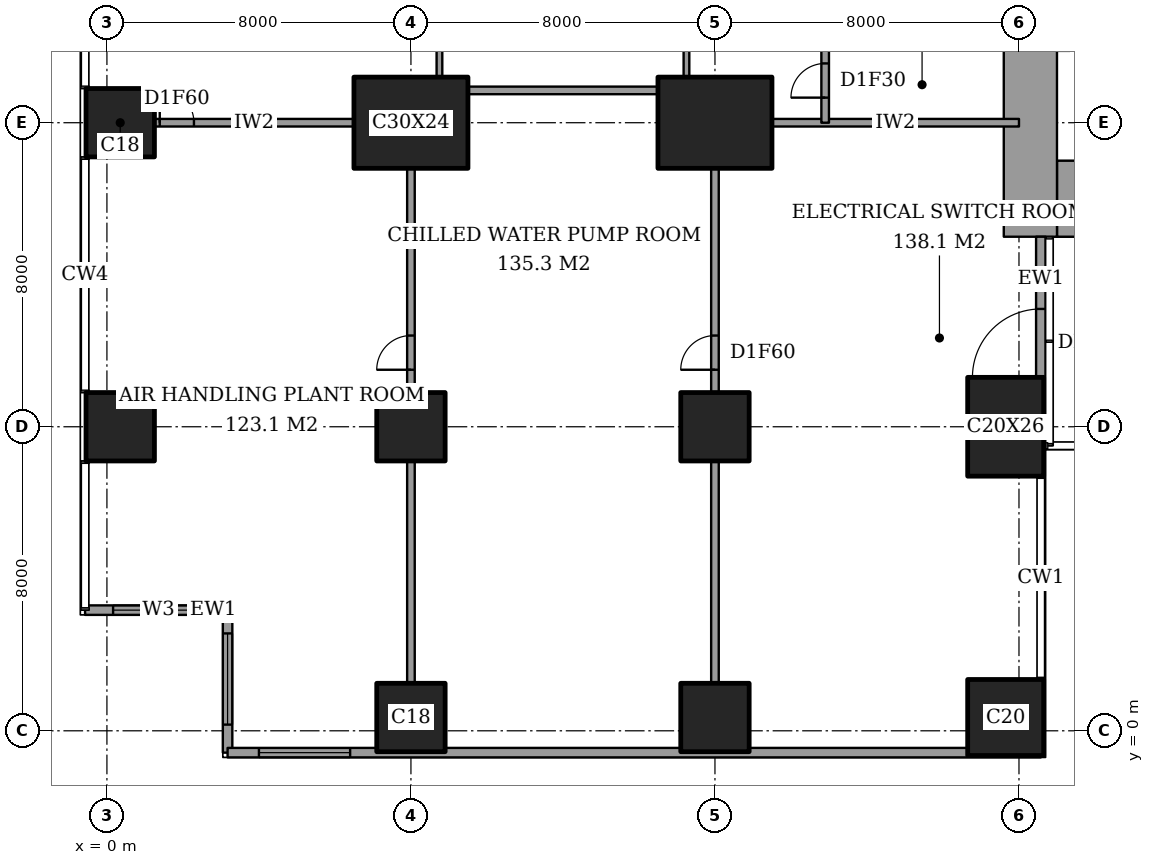
"""IFC4 building model, lengths in metres.
Left out: names, types, materials, properties, quantities, classifications, styles, units other than length and angle.
Written with IfcOpenShell. Run it as: python <this file> out.ifc"""

import sys

from ifc_helpers import new_model, si_unit, direction, frame, frame_2d, origin, origin_2d, place, context, subcontext, project, spatial, rectangle, extrude, element, fill, save


model = new_model("IFC4")
c1 = context("Model", 3, precision=1e-05, world=origin(), true_north=direction((0.0, 1.0)))
c2 = subcontext(c1, "Body", "Model", "MODEL_VIEW")
j1 = project(units=[si_unit("LENGTHUNIT", "METRE"), si_unit("PLANEANGLEUNIT", "RADIAN")], contexts=[c1])
p1 = place(None, origin())
s1 = spatial("IfcSite", under=j1, at=p1, CompositionType="ELEMENT")
p2 = place(p1, origin())
s2 = spatial("IfcBuilding", under=s1, at=p2, CompositionType="ELEMENT")
p3 = place(p2, frame((0.0, 0.0, 177.2)))
s3 = spatial("IfcBuildingStorey", under=s2, at=p3, CompositionType="ELEMENT", Elevation=177.2)
for number, where, z_axis, x_axis in (
    (1, (0.35, 8.0, 0.0), (0.0, 0.0, 1.0), (1.0, 0.0, 0.0)),
    (2, (0.35, 16.0, 0.0), (0.0, 0.0, 1.0), (1.0, 0.0, 0.0)),
    (3, (8.0, 0.35, 0.0), (0.0, 0.0, 1.0), (1.0, 0.0, 0.0)),
    (4, (8.0, 8.0, 0.0), (0.0, 0.0, 1.0), (1.0, 0.0, 0.0)),
):
    element("IfcColumn", number, at=place(p3, frame(where, z_axis=z_axis, x_axis=x_axis)), inside=s3, PredefinedType="COLUMN", context=c2, shape_type="SweptSolid", body=[
        extrude(rectangle(XDim=1.8, YDim=1.8, at=origin_2d()), origin(), (0.0, 0.0, 1.0), 5.0),
    ])
p4 = place(p3, frame((8.0, 16.0, 0.0), z_axis=(0.0, 0.0, 1.0), x_axis=(1.0, 0.0, 0.0)))
e5 = element("IfcColumn", 5, at=p4, inside=s3, PredefinedType="COLUMN", context=c2, shape_type="SweptSolid", body=[
    extrude(rectangle(XDim=3.0, YDim=2.4, at=origin_2d()), origin(), (0.0, 0.0, 1.0), 5.0),
])
for number, where, z_axis, x_axis in (
    (6, (16.0, 0.35, 0.0), (0.0, 0.0, 1.0), (1.0, 0.0, 0.0)),
    (7, (16.0, 8.0, 0.0), (0.0, 0.0, 1.0), (1.0, 0.0, 0.0)),
):
    element("IfcColumn", number, at=place(p3, frame(where, z_axis=z_axis, x_axis=x_axis)), inside=s3, PredefinedType="COLUMN", context=c2, shape_type="SweptSolid", body=[
        extrude(rectangle(XDim=1.8, YDim=1.8, at=origin_2d()), origin(), (0.0, 0.0, 1.0), 5.0),
    ])
p5 = place(p3, frame((16.0, 16.0, 0.0), z_axis=(0.0, 0.0, 1.0), x_axis=(1.0, 0.0, 0.0)))
e8 = element("IfcColumn", 8, at=p5, inside=s3, PredefinedType="COLUMN", context=c2, shape_type="SweptSolid", body=[
    extrude(rectangle(XDim=3.0, YDim=2.4, at=origin_2d()), origin(), (0.0, 0.0, 1.0), 5.0),
])
p6 = place(p3, frame((23.65, 0.35, 0.0), z_axis=(0.0, 0.0, 1.0), x_axis=(1.0, 0.0, 0.0)))
e9 = element("IfcColumn", 9, at=p6, inside=s3, PredefinedType="COLUMN", context=c2, shape_type="SweptSolid", body=[
    extrude(rectangle(XDim=2.0, YDim=2.0, at=origin_2d()), origin(), (0.0, 0.0, 1.0), 5.0),
])
p7 = place(p3, frame((23.65, 8.0, 0.0), z_axis=(0.0, 0.0, 1.0), x_axis=(1.0, 0.0, 0.0)))
e10 = element("IfcColumn", 10, at=p7, inside=s3, PredefinedType="COLUMN", context=c2, shape_type="SweptSolid", body=[
    extrude(rectangle(XDim=2.0, YDim=2.6, at=origin_2d()), origin(), (0.0, 0.0, 1.0), 5.0),
])
p8 = place(p3, frame((25.0, 14.0, 0.0), z_axis=(0.0, 0.0, 1.0), x_axis=(1.0, 0.0, 0.0)))
e11 = element("IfcWall", 11, at=p8, inside=s3, PredefinedType="SHEAR", context=c2, shape_type="SweptSolid", body=[
    extrude(rectangle(XDim=3.15, YDim=2.0, at=frame_2d((1.575, 0.0))), origin(), (0.0, 0.0, 1.0), 5.0),
])
p9 = place(p3, frame((24.3, 13.0, 0.0), z_axis=(0.0, 0.0, 1.0), x_axis=(0.0, 1.0, 0.0)))
e12 = element("IfcWall", 12, at=p9, inside=s3, PredefinedType="SHEAR", context=c2, shape_type="SweptSolid", body=[
    extrude(rectangle(XDim=10.15, YDim=1.4, at=frame_2d((5.075, 0.0))), origin(), (0.0, 0.0, 1.0), 5.0),
])
p10 = place(p3, frame((24.575, 7.4, 0.0), z_axis=(0.0, 0.0, 1.0), x_axis=(0.0, 1.0, 0.0)))
e13 = element("IfcWall", 13, at=p10, inside=s3, PredefinedType="SOLIDWALL", context=c2, shape_type="SweptSolid", body=[
    extrude(rectangle(XDim=5.6, YDim=0.25, at=frame_2d((2.8, 0.0))), origin(), (0.0, 0.0, 1.0), 5.0),
])
p11 = place(p10, frame((1.9, 0.0, 0.0)))
e14 = element("IfcOpeningElement", 14, at=p11, cuts=e13, PredefinedType="OPENING", context=c2, shape_type="SweptSolid", body=[
    extrude(rectangle(XDim=1.8, YDim=2.4, at=frame_2d((0.9, 1.2))), frame((0.0, 0.135, 0.0), z_axis=(0.0, -1.0, 0.0), x_axis=(1.0, 0.0, 0.0)), (0.0, 0.0, 1.0), 0.27),
])
p12 = place(p3, frame((-0.575, 3.175, 0.0), z_axis=(0.0, 0.0, 1.0), x_axis=(1.0, 0.0, 0.0)))
e15 = element("IfcWall", 15, at=p12, inside=s3, PredefinedType="SOLIDWALL", context=c2, shape_type="SweptSolid", body=[
    extrude(rectangle(XDim=3.75, YDim=0.25, at=frame_2d((1.875, 0.0))), origin(), (0.0, 0.0, 1.0), 5.0),
])
p13 = place(p12, frame((0.738, 0.0, 0.6)))
e16 = element("IfcOpeningElement", 16, at=p13, cuts=e15, PredefinedType="OPENING", context=c2, shape_type="SweptSolid", body=[
    extrude(rectangle(XDim=2.4, YDim=3.0, at=frame_2d((1.2, 1.5))), frame((0.0, 0.135, 0.0), z_axis=(0.0, -1.0, 0.0), x_axis=(1.0, 0.0, 0.0)), (0.0, 0.0, 1.0), 0.27),
])
p14 = place(p3, frame((3.175, 3.175, 0.0), z_axis=(0.0, 0.0, 1.0), x_axis=(0.0, -1.0, 0.0)))
e17 = element("IfcWall", 17, at=p14, inside=s3, PredefinedType="SOLIDWALL", context=c2, shape_type="SweptSolid", body=[
    extrude(rectangle(XDim=3.75, YDim=0.25, at=frame_2d((1.875, 0.0))), origin(), (0.0, 0.0, 1.0), 5.0),
])
p15 = place(p14, frame((0.613, 0.0, 0.6)))
e18 = element("IfcOpeningElement", 18, at=p15, cuts=e17, PredefinedType="OPENING", context=c2, shape_type="SweptSolid", body=[
    extrude(rectangle(XDim=2.4, YDim=3.0, at=frame_2d((1.2, 1.5))), frame((0.0, 0.135, 0.0), z_axis=(0.0, -1.0, 0.0), x_axis=(1.0, 0.0, 0.0)), (0.0, 0.0, 1.0), 0.27),
])
p16 = place(p3, frame((3.175, -0.575, 0.0), z_axis=(0.0, 0.0, 1.0), x_axis=(1.0, 0.0, 0.0)))
e19 = element("IfcWall", 19, at=p16, inside=s3, PredefinedType="SOLIDWALL", context=c2, shape_type="SweptSolid", body=[
    extrude(rectangle(XDim=21.4, YDim=0.25, at=frame_2d((10.7, 0.0))), origin(), (0.0, 0.0, 1.0), 5.0),
])
p17 = place(p16, frame((0.825, 0.0, 0.6)))
e20 = element("IfcOpeningElement", 20, at=p17, cuts=e19, PredefinedType="OPENING", context=c2, shape_type="SweptSolid", body=[
    extrude(rectangle(XDim=2.4, YDim=3.0, at=frame_2d((1.2, 1.5))), frame((0.0, 0.135, 0.0), z_axis=(0.0, -1.0, 0.0), x_axis=(1.0, 0.0, 0.0)), (0.0, 0.0, 1.0), 0.27),
])
p18 = place(p3, frame((1.25, 16.0, 0.0), z_axis=(0.0, 0.0, 1.0), x_axis=(1.0, 0.0, 0.0)))
e21 = element("IfcWall", 21, at=p18, inside=s3, PredefinedType="PARTITIONING", context=c2, shape_type="SweptSolid", body=[
    extrude(rectangle(XDim=5.25, YDim=0.2, at=frame_2d((2.625, 0.0))), origin(), (0.0, 0.0, 1.0), 4.75),
])
p19 = place(p18, frame((0.14, 0.0, 0.0)))
e22 = element("IfcOpeningElement", 22, at=p19, cuts=e21, PredefinedType="OPENING", context=c2, shape_type="SweptSolid", body=[
    extrude(rectangle(XDim=0.9, YDim=2.1, at=frame_2d((0.45, 1.05))), frame((0.0, 0.11, 0.0), z_axis=(0.0, -1.0, 0.0), x_axis=(1.0, 0.0, 0.0)), (0.0, 0.0, 1.0), 0.22),
])
p20 = place(p3, frame((17.5, 16.0, 0.0), z_axis=(0.0, 0.0, 1.0), x_axis=(1.0, 0.0, 0.0)))
e23 = element("IfcWall", 23, at=p20, inside=s3, PredefinedType="PARTITIONING", context=c2, shape_type="SweptSolid", body=[
    extrude(rectangle(XDim=6.5, YDim=0.2, at=frame_2d((3.25, 0.0))), origin(), (0.0, 0.0, 1.0), 4.75),
])
p21 = place(p3, frame((9.5, 16.85, 0.0), z_axis=(0.0, 0.0, 1.0), x_axis=(1.0, 0.0, 0.0)))
e24 = element("IfcWall", 24, at=p21, inside=s3, PredefinedType="PARTITIONING", context=c2, shape_type="SweptSolid", body=[
    extrude(rectangle(XDim=5.0, YDim=0.2, at=frame_2d((2.5, 0.0))), origin(), (0.0, 0.0, 1.0), 4.75),
])
p22 = place(p3, frame((8.0, 1.25, 0.0), z_axis=(0.0, 0.0, 1.0), x_axis=(0.0, 1.0, 0.0)))
e25 = element("IfcWall", 25, at=p22, inside=s3, PredefinedType="PARTITIONING", context=c2, shape_type="SweptSolid", body=[
    extrude(rectangle(XDim=5.85, YDim=0.2, at=frame_2d((2.925, 0.0))), origin(), (0.0, 0.0, 1.0), 4.75),
])
p23 = place(p3, frame((8.0, 8.9, 0.0), z_axis=(0.0, 0.0, 1.0), x_axis=(0.0, 1.0, 0.0)))
e26 = element("IfcWall", 26, at=p23, inside=s3, PredefinedType="PARTITIONING", context=c2, shape_type="SweptSolid", body=[
    extrude(rectangle(XDim=5.9, YDim=0.2, at=frame_2d((2.95, 0.0))), origin(), (0.0, 0.0, 1.0), 4.75),
])
p24 = place(p23, frame((0.6, 0.0, 0.0)))
e27 = element("IfcOpeningElement", 27, at=p24, cuts=e26, PredefinedType="OPENING", context=c2, shape_type="SweptSolid", body=[
    extrude(rectangle(XDim=0.9, YDim=2.1, at=frame_2d((0.45, 1.05))), frame((0.0, 0.11, 0.0), z_axis=(0.0, -1.0, 0.0), x_axis=(1.0, 0.0, 0.0)), (0.0, 0.0, 1.0), 0.22),
])
p25 = place(p3, frame((8.75, 17.2, 0.0), z_axis=(0.0, 0.0, 1.0), x_axis=(0.0, 1.0, 0.0)))
e28 = element("IfcWall", 28, at=p25, inside=s3, PredefinedType="PARTITIONING", context=c2, shape_type="SweptSolid", body=[
    extrude(rectangle(XDim=5.9, YDim=0.15, at=frame_2d((2.95, 0.0))), origin(), (0.0, 0.0, 1.0), 4.75),
])
p26 = place(p25, frame((4.14, 0.0, 0.0)))
e29 = element("IfcOpeningElement", 29, at=p26, cuts=e28, PredefinedType="OPENING", context=c2, shape_type="SweptSolid", body=[
    extrude(rectangle(XDim=1.0, YDim=2.1, at=frame_2d((0.5, 1.05))), frame((0.0, 0.085, 0.0), z_axis=(0.0, -1.0, 0.0), x_axis=(1.0, 0.0, 0.0)), (0.0, 0.0, 1.0), 0.17),
])
p27 = place(p3, frame((15.25, 17.2, 0.0), z_axis=(0.0, 0.0, 1.0), x_axis=(0.0, 1.0, 0.0)))
e30 = element("IfcWall", 30, at=p27, inside=s3, PredefinedType="PARTITIONING", context=c2, shape_type="SweptSolid", body=[
    extrude(rectangle(XDim=5.9, YDim=0.15, at=frame_2d((2.95, 0.0))), origin(), (0.0, 0.0, 1.0), 4.75),
])
p28 = place(p3, frame((16.0, 1.25, 0.0), z_axis=(0.0, 0.0, 1.0), x_axis=(0.0, 1.0, 0.0)))
e31 = element("IfcWall", 31, at=p28, inside=s3, PredefinedType="PARTITIONING", context=c2, shape_type="SweptSolid", body=[
    extrude(rectangle(XDim=5.85, YDim=0.2, at=frame_2d((2.925, 0.0))), origin(), (0.0, 0.0, 1.0), 4.75),
])
p29 = place(p3, frame((16.0, 8.9, 0.0), z_axis=(0.0, 0.0, 1.0), x_axis=(0.0, 1.0, 0.0)))
e32 = element("IfcWall", 32, at=p29, inside=s3, PredefinedType="PARTITIONING", context=c2, shape_type="SweptSolid", body=[
    extrude(rectangle(XDim=5.9, YDim=0.2, at=frame_2d((2.95, 0.0))), origin(), (0.0, 0.0, 1.0), 4.75),
])
p30 = place(p29, frame((0.6, 0.0, 0.0)))
e33 = element("IfcOpeningElement", 33, at=p30, cuts=e32, PredefinedType="OPENING", context=c2, shape_type="SweptSolid", body=[
    extrude(rectangle(XDim=0.9, YDim=2.1, at=frame_2d((0.45, 1.05))), frame((0.0, 0.11, 0.0), z_axis=(0.0, -1.0, 0.0), x_axis=(1.0, 0.0, 0.0)), (0.0, 0.0, 1.0), 0.22),
])
p31 = place(p3, frame((18.9, 16.0, 0.0), z_axis=(0.0, 0.0, 1.0), x_axis=(0.0, 1.0, 0.0)))
e34 = element("IfcWall", 34, at=p31, inside=s3, PredefinedType="PARTITIONING", context=c2, shape_type="SweptSolid", body=[
    extrude(rectangle(XDim=4.0, YDim=0.2, at=frame_2d((2.0, 0.0))), origin(), (0.0, 0.0, 1.0), 4.75),
])
p32 = place(p31, frame((0.66, 0.0, 0.0)))
e35 = element("IfcOpeningElement", 35, at=p32, cuts=e34, PredefinedType="OPENING", context=c2, shape_type="SweptSolid", body=[
    extrude(rectangle(XDim=0.9, YDim=2.1, at=frame_2d((0.45, 1.05))), frame((0.0, 0.11, 0.0), z_axis=(0.0, -1.0, 0.0), x_axis=(1.0, 0.0, 0.0)), (0.0, 0.0, 1.0), 0.22),
])
p33 = place(p31, frame((2.54, 0.0, 0.0)))
e36 = element("IfcOpeningElement", 36, at=p33, cuts=e34, PredefinedType="OPENING", context=c2, shape_type="SweptSolid", body=[
    extrude(rectangle(XDim=0.9, YDim=2.1, at=frame_2d((0.45, 1.05))), frame((0.0, 0.11, 0.0), z_axis=(0.0, -1.0, 0.0), x_axis=(1.0, 0.0, 0.0)), (0.0, 0.0, 1.0), 0.22),
])
p34 = place(p11, origin())
e37 = element("IfcDoor", 37, at=p34, inside=s3, OperationType="DOUBLE_DOOR_DOUBLE_SWING", PredefinedType="DOOR", context=c2, shape_type="SweptSolid", body=[
    extrude(rectangle(XDim=1.8, YDim=2.4, at=frame_2d((0.9, 1.2))), frame((0.0, 0.025, 0.0), z_axis=(0.0, -1.0, 0.0), x_axis=(1.0, 0.0, 0.0)), (0.0, 0.0, 1.0), 0.05),
])
fill(e14, e37)
p35 = place(p13, origin())
e38 = element("IfcWindow", 38, at=p35, inside=s3, PartitioningType="SINGLE_PANEL", PredefinedType="WINDOW", context=c2, shape_type="SweptSolid", body=[
    extrude(rectangle(XDim=2.4, YDim=3.0, at=frame_2d((1.2, 1.5))), frame((0.0, 0.03, 0.0), z_axis=(0.0, -1.0, 0.0), x_axis=(1.0, 0.0, 0.0)), (0.0, 0.0, 1.0), 0.06),
])
fill(e16, e38)
p36 = place(p15, origin())
e39 = element("IfcWindow", 39, at=p36, inside=s3, PartitioningType="SINGLE_PANEL", PredefinedType="WINDOW", context=c2, shape_type="SweptSolid", body=[
    extrude(rectangle(XDim=2.4, YDim=3.0, at=frame_2d((1.2, 1.5))), frame((0.0, 0.03, 0.0), z_axis=(0.0, -1.0, 0.0), x_axis=(1.0, 0.0, 0.0)), (0.0, 0.0, 1.0), 0.06),
])
fill(e18, e39)
p37 = place(p17, origin())
e40 = element("IfcWindow", 40, at=p37, inside=s3, PartitioningType="SINGLE_PANEL", PredefinedType="WINDOW", context=c2, shape_type="SweptSolid", body=[
    extrude(rectangle(XDim=2.4, YDim=3.0, at=frame_2d((1.2, 1.5))), frame((0.0, 0.03, 0.0), z_axis=(0.0, -1.0, 0.0), x_axis=(1.0, 0.0, 0.0)), (0.0, 0.0, 1.0), 0.06),
])
fill(e20, e40)
p38 = place(p32, origin())
e41 = element("IfcDoor", 41, at=p38, inside=s3, OperationType="SINGLE_SWING_RIGHT", PredefinedType="DOOR", context=c2, shape_type="SweptSolid", body=[
    extrude(rectangle(XDim=0.9, YDim=2.1, at=frame_2d((0.45, 1.05))), frame((0.0, 0.025, 0.0), z_axis=(0.0, -1.0, 0.0), x_axis=(1.0, 0.0, 0.0)), (0.0, 0.0, 1.0), 0.05),
])
fill(e35, e41)
p39 = place(p19, origin())
e42 = element("IfcDoor", 42, at=p39, inside=s3, OperationType="SINGLE_SWING_RIGHT", PredefinedType="DOOR", context=c2, shape_type="SweptSolid", body=[
    extrude(rectangle(XDim=0.9, YDim=2.1, at=frame_2d((0.45, 1.05))), frame((0.0, 0.025, 0.0), z_axis=(0.0, -1.0, 0.0), x_axis=(1.0, 0.0, 0.0)), (0.0, 0.0, 1.0), 0.05),
])
fill(e22, e42)
p40 = place(p24, origin())
e43 = element("IfcDoor", 43, at=p40, inside=s3, OperationType="SINGLE_SWING_RIGHT", PredefinedType="DOOR", context=c2, shape_type="SweptSolid", body=[
    extrude(rectangle(XDim=0.9, YDim=2.1, at=frame_2d((0.45, 1.05))), frame((0.0, 0.025, 0.0), z_axis=(0.0, -1.0, 0.0), x_axis=(1.0, 0.0, 0.0)), (0.0, 0.0, 1.0), 0.05),
])
fill(e27, e43)
p41 = place(p30, origin())
e44 = element("IfcDoor", 44, at=p41, inside=s3, OperationType="SINGLE_SWING_RIGHT", PredefinedType="DOOR", context=c2, shape_type="SweptSolid", body=[
    extrude(rectangle(XDim=0.9, YDim=2.1, at=frame_2d((0.45, 1.05))), frame((0.0, 0.025, 0.0), z_axis=(0.0, -1.0, 0.0), x_axis=(1.0, 0.0, 0.0)), (0.0, 0.0, 1.0), 0.05),
])
fill(e33, e44)
save(model, sys.argv[1])
